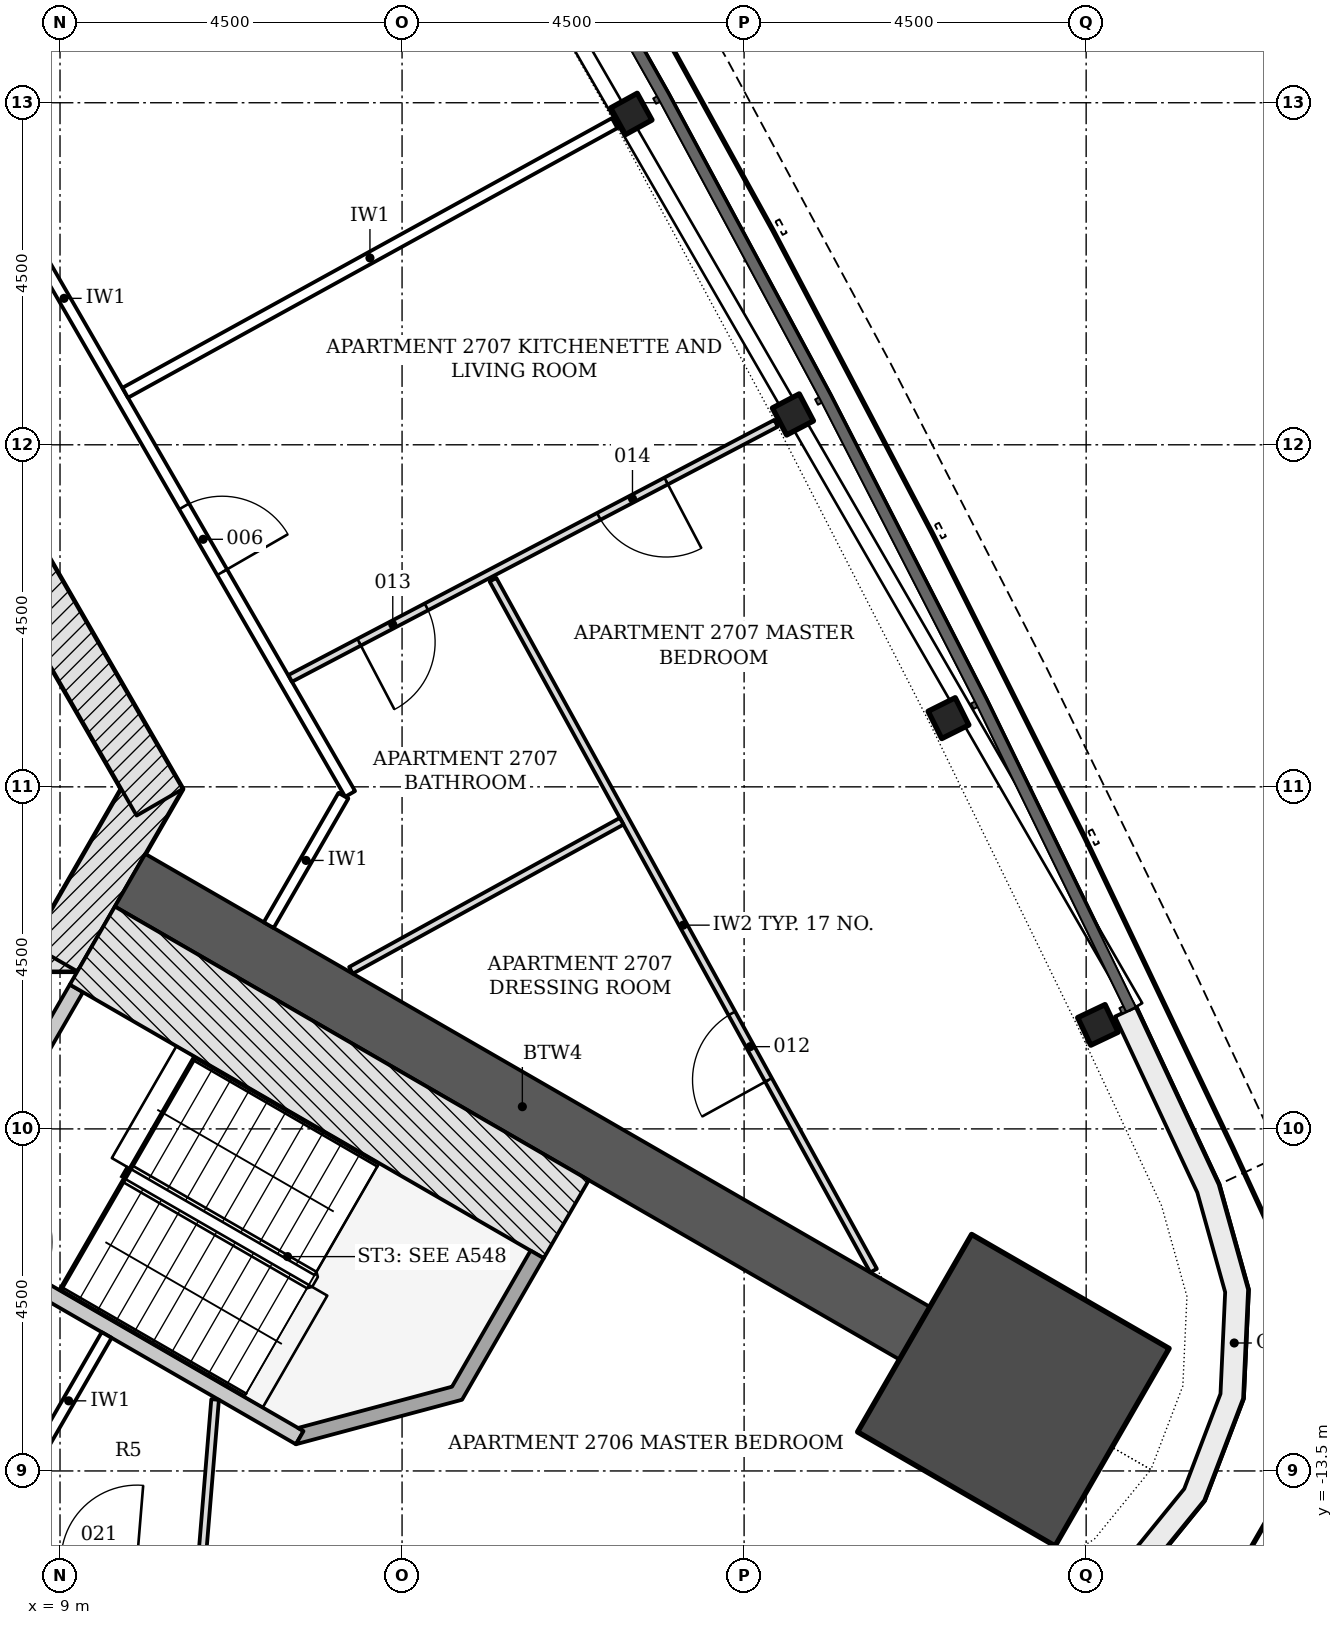
"""IFC4 building model, lengths in metres.
Left out: names, types, materials, properties, quantities, classifications, styles, units other than length and angle.
Written with IfcOpenShell. Run it as: python <this file> out.ifc"""

import sys

from ifc_helpers import new_model, si_unit, direction, frame, frame_2d, origin, origin_2d, place, context, subcontext, project, spatial, polyline, rectangle, i_section, outline, extrude, element, fill, save


model = new_model("IFC4")
c1 = context("Model", 3, precision=1e-05, world=origin(), true_north=direction((0.0, 1.0)))
c2 = subcontext(c1, "Body", "Model", "MODEL_VIEW")
j1 = project(units=[si_unit("LENGTHUNIT", "METRE"), si_unit("PLANEANGLEUNIT", "RADIAN")], contexts=[c1])
p1 = place(None, origin())
s1 = spatial("IfcSite", under=j1, at=p1, CompositionType="ELEMENT")
p2 = place(p1, origin())
s2 = spatial("IfcBuilding", under=s1, at=p2, CompositionType="ELEMENT")
p3 = place(p2, frame((0.0, 0.0, 105.9)))
s3 = spatial("IfcBuildingStorey", under=s2, at=p3, CompositionType="ELEMENT", Elevation=105.9)
p4 = place(p3, frame((-9.229, -6.578, -0.2), z_axis=(0.0, 0.0, 1.0), x_axis=(1.0, 0.0, 0.0)))
e1 = element("IfcWall", 1, at=p4, inside=s3, PredefinedType="SHEAR", context=c2, shape_type="SweptSolid", body=[
    extrude(rectangle(XDim=18.458, YDim=0.7, at=frame_2d((9.229, 0.0))), origin(), (0.0, 0.0, 1.0), 3.6),
])
p5 = place(p4, frame((3.304, 0.0, 0.2)))
e2 = element("IfcOpeningElement", 2, at=p5, cuts=e1, PredefinedType="OPENING", context=c2, shape_type="SweptSolid", body=[
    extrude(rectangle(XDim=1.1, YDim=2.1, at=frame_2d((0.55, 1.05))), frame((0.0, 0.36, 0.0), z_axis=(0.0, -1.0, 0.0), x_axis=(1.0, 0.0, 0.0)), (0.0, 0.0, 1.0), 0.72),
])
p6 = place(p4, frame((5.454, 0.0, 0.2)))
e3 = element("IfcOpeningElement", 3, at=p6, cuts=e1, PredefinedType="OPENING", context=c2, shape_type="SweptSolid", body=[
    extrude(rectangle(XDim=1.1, YDim=2.1, at=frame_2d((0.55, 1.05))), frame((0.0, 0.36, 0.0), z_axis=(0.0, -1.0, 0.0), x_axis=(1.0, 0.0, 0.0)), (0.0, 0.0, 1.0), 0.72),
])
p7 = place(p4, frame((7.604, 0.0, 0.2)))
e4 = element("IfcOpeningElement", 4, at=p7, cuts=e1, PredefinedType="OPENING", context=c2, shape_type="SweptSolid", body=[
    extrude(rectangle(XDim=1.1, YDim=2.1, at=frame_2d((0.55, 1.05))), frame((0.0, 0.36, 0.0), z_axis=(0.0, -1.0, 0.0), x_axis=(1.0, 0.0, 0.0)), (0.0, 0.0, 1.0), 0.72),
])
p8 = place(p4, frame((9.754, 0.0, 0.2)))
e5 = element("IfcOpeningElement", 5, at=p8, cuts=e1, PredefinedType="OPENING", context=c2, shape_type="SweptSolid", body=[
    extrude(rectangle(XDim=1.1, YDim=2.1, at=frame_2d((0.55, 1.05))), frame((0.0, 0.36, 0.0), z_axis=(0.0, -1.0, 0.0), x_axis=(1.0, 0.0, 0.0)), (0.0, 0.0, 1.0), 0.72),
])
p9 = place(p4, frame((11.904, 0.0, 0.2)))
e6 = element("IfcOpeningElement", 6, at=p9, cuts=e1, PredefinedType="OPENING", context=c2, shape_type="SweptSolid", body=[
    extrude(rectangle(XDim=1.1, YDim=2.1, at=frame_2d((0.55, 1.05))), frame((0.0, 0.36, 0.0), z_axis=(0.0, -1.0, 0.0), x_axis=(1.0, 0.0, 0.0)), (0.0, 0.0, 1.0), 0.72),
])
p10 = place(p4, frame((14.054, 0.0, 0.2)))
e7 = element("IfcOpeningElement", 7, at=p10, cuts=e1, PredefinedType="OPENING", context=c2, shape_type="SweptSolid", body=[
    extrude(rectangle(XDim=1.1, YDim=2.1, at=frame_2d((0.55, 1.05))), frame((0.0, 0.36, 0.0), z_axis=(0.0, -1.0, 0.0), x_axis=(1.0, 0.0, 0.0)), (0.0, 0.0, 1.0), 0.72),
])
p11 = place(p4, frame((1.029, 0.0, 0.2)))
e8 = element("IfcOpeningElement", 8, at=p11, cuts=e1, PredefinedType="OPENING", context=c2, shape_type="SweptSolid", body=[
    extrude(rectangle(XDim=1.0, YDim=2.1, at=frame_2d((0.5, 1.05))), frame((0.0, 0.36, 0.0), z_axis=(0.0, -1.0, 0.0), x_axis=(1.0, 0.0, 0.0)), (0.0, 0.0, 1.0), 0.72),
])
p12 = place(p3, frame((8.926, -6.753, -0.2), z_axis=(0.0, 0.0, 1.0), x_axis=(0.500042739161, 0.866000726912, 0.0)))
e9 = element("IfcWall", 9, at=p12, inside=s3, PredefinedType="SHEAR", context=c2, shape_type="SweptSolid", body=[
    extrude(rectangle(XDim=2.771, YDim=0.7, at=frame_2d((1.386, 0.0))), origin(), (0.0, 0.0, 1.0), 3.6),
])
p13 = place(p3, frame((10.311, -4.703, -0.2), z_axis=(0.0, 0.0, 1.0), x_axis=(-0.500001446645, 0.866024568562, 0.0)))
e10 = element("IfcWall", 10, at=p13, inside=s3, PredefinedType="SHEAR", context=c2, shape_type="SweptSolid", body=[
    extrude(rectangle(XDim=18.458, YDim=0.7, at=frame_2d((9.229, 0.0))), origin(), (0.0, 0.0, 1.0), 3.6),
])
p14 = place(p13, frame((10.5, 0.0, 0.2)))
e11 = element("IfcOpeningElement", 11, at=p14, cuts=e10, PredefinedType="OPENING", context=c2, shape_type="SweptSolid", body=[
    extrude(rectangle(XDim=1.0, YDim=2.1, at=frame_2d((0.5, 1.05))), frame((0.0, 0.36, 0.0), z_axis=(0.0, -1.0, 0.0), x_axis=(1.0, 0.0, 0.0)), (0.0, 0.0, 1.0), 0.72),
])
p15 = place(p13, frame((4.877, 0.0, 0.2)))
e12 = element("IfcOpeningElement", 12, at=p15, cuts=e10, PredefinedType="OPENING", context=c2, shape_type="SweptSolid", body=[
    extrude(rectangle(XDim=0.9, YDim=2.1, at=frame_2d((0.45, 1.05))), frame((0.0, 0.36, 0.0), z_axis=(0.0, -1.0, 0.0), x_axis=(1.0, 0.0, 0.0)), (0.0, 0.0, 1.0), 0.72),
])
p16 = place(p13, frame((14.452, 0.0, 0.2)))
e13 = element("IfcOpeningElement", 13, at=p16, cuts=e10, PredefinedType="OPENING", context=c2, shape_type="SweptSolid", body=[
    extrude(rectangle(XDim=0.9, YDim=2.1, at=frame_2d((0.45, 1.05))), frame((0.0, 0.36, 0.0), z_axis=(0.0, -1.0, 0.0), x_axis=(1.0, 0.0, 0.0)), (0.0, 0.0, 1.0), 0.72),
])
p17 = place(p3, frame((9.922, -5.728, -0.2), z_axis=(0.0, 0.0, 1.0), x_axis=(0.866027307971, -0.499996701837, 0.0)))
e14 = element("IfcWall", 14, at=p17, inside=s3, PredefinedType="SHEAR", context=c2, shape_type="SweptSolid", body=[
    extrude(rectangle(XDim=11.918, YDim=0.8, at=frame_2d((5.959, 0.0))), origin(), (0.0, 0.0, 1.0), 3.6),
])
p18 = place(p3, frame((21.542, -12.438, -0.2), z_axis=(0.0, 0.0, 1.0), x_axis=(0.866025403784, -0.5, 0.0)))
e15 = element("IfcColumn", 15, at=p18, inside=s3, PredefinedType="COLUMN", context=c2, shape_type="SweptSolid", body=[
    extrude(rectangle(XDim=3.0, YDim=3.0, at=origin_2d()), origin(), (0.0, 0.0, 1.0), 3.6),
])
for number, where, z_axis, x_axis in (
    (16, (22.655, -7.632, -0.2), (0.0, 0.0, 1.0), (-0.429, 0.903, 0.0)),
    (17, (20.689, -3.596, -0.2), (0.0, 0.0, 1.0), (-0.447, 0.895, 0.0)),
    (18, (18.642, 0.399, -0.2), (0.0, 0.0, 1.0), (-0.465, 0.885, 0.0)),
    (19, (16.516, 4.353, -0.2), (0.0, 0.0, 1.0), (-0.483, 0.876, 0.0)),
):
    element("IfcColumn", number, at=place(p3, frame(where, z_axis=z_axis, x_axis=x_axis)), inside=s3, PredefinedType="COLUMN", context=c2, shape_type="SweptSolid", body=[
        extrude(i_section(OverallWidth=0.401, OverallDepth=0.399, WebThickness=0.025, FlangeThickness=0.04, FilletRadius=0.015, at=origin_2d()), origin(), (0.0, 0.0, 1.0), 3.6),
    ])
p19 = place(p3, origin())
e20 = element("IfcWall", 20, at=p19, inside=s3, PredefinedType="NOTDEFINED", context=c2, shape_type="SweptSolid", body=[
    extrude(outline(polyline([(17.981, -16.352), (20.551, -16.13), (21.94, -15.774), (23.148, -15.0), (24.054, -13.887), (24.565, -12.547), (24.631, -11.114), (24.245, -9.732), (23.152, -7.396), (22.88, -7.523), (23.962, -9.837), (24.329, -11.148), (24.267, -12.485), (23.791, -13.735), (22.946, -14.774), (21.819, -15.495), (20.5, -15.833), (17.955, -16.053), (17.981, -16.352)])), origin(), (0.0, 0.0, 1.0), 3.3),
])
p20 = place(p3, frame((7.44, -10.226, -0.2), z_axis=(0.0, 0.0, 1.0), x_axis=(0.500022077904, 0.866012656725, 0.0)))
e21 = element("IfcWall", 21, at=p20, inside=s3, PredefinedType="SHEAR", context=c2, shape_type="SweptSolid", body=[
    extrude(rectangle(XDim=3.55, YDim=0.2, at=frame_2d((1.775, 0.0))), origin(), (0.0, 0.0, 1.0), 3.6),
])
p21 = place(p20, frame((1.175, 0.0, 0.2)))
e22 = element("IfcOpeningElement", 22, at=p21, cuts=e21, PredefinedType="OPENING", context=c2, shape_type="SweptSolid", body=[
    extrude(rectangle(XDim=1.2, YDim=2.1, at=frame_2d((0.6, 1.05))), frame((0.0, 0.11, 0.0), z_axis=(0.0, -1.0, 0.0), x_axis=(1.0, 0.0, 0.0)), (0.0, 0.0, 1.0), 0.22),
])
p22 = place(p3, frame((7.304, -10.262, -0.2), z_axis=(0.0, 0.0, 1.0), x_axis=(0.866026594901, -0.49999793692, 0.0)))
e23 = element("IfcWall", 23, at=p22, inside=s3, PredefinedType="SHEAR", context=c2, shape_type="SweptSolid", body=[
    extrude(rectangle(XDim=5.6, YDim=0.2, at=frame_2d((2.8, 0.0))), origin(), (0.0, 0.0, 1.0), 3.6),
])
p23 = place(p22, frame((0.45, 0.0, 0.2)))
e24 = element("IfcOpeningElement", 24, at=p23, cuts=e23, PredefinedType="OPENING", context=c2, shape_type="SweptSolid", body=[
    extrude(rectangle(XDim=1.2, YDim=2.1, at=frame_2d((0.6, 1.05))), frame((0.0, 0.11, 0.0), z_axis=(0.0, -1.0, 0.0), x_axis=(1.0, 0.0, 0.0)), (0.0, 0.0, 1.0), 0.22),
])
p24 = place(p3, frame((9.425, -6.588, -0.2), z_axis=(0.0, 0.0, 1.0), x_axis=(0.866018442252, -0.500012057535, 0.0)))
e25 = element("IfcWall", 25, at=p24, inside=s3, PredefinedType="SHEAR", context=c2, shape_type="SweptSolid", body=[
    extrude(rectangle(XDim=7.2, YDim=1.186, at=frame_2d((3.6, 0.0))), origin(), (0.0, 0.0, 1.0), 3.6),
])
p25 = place(p3, frame((0.0, 0.0, -0.2)))
e26 = element("IfcWall", 26, at=p25, inside=s3, PredefinedType="SHEAR", context=c2, shape_type="SweptSolid", body=[
    extrude(outline(polyline([(12.104, -13.149), (14.289, -12.563), (15.364, -10.701), (15.191, -10.601), (14.157, -12.392), (12.132, -12.934), (12.204, -12.976), (12.204, -12.976), (12.204, -12.976), (12.204, -12.976), (12.204, -12.976), (12.204, -12.976), (12.204, -12.976), (12.204, -12.976), (12.204, -12.976), (12.204, -12.976), (12.204, -12.976), (12.204, -12.976), (12.204, -12.976), (12.204, -12.976), (12.204, -12.976), (12.204, -12.976), (12.204, -12.976), (12.104, -13.149)])), origin(), (0.0, 0.0, 1.0), 3.6),
])
p26 = place(p3, frame((5.289, 8.446, 0.0), z_axis=(0.0, 0.0, 1.0), x_axis=(0.499996620721, -0.866027354803, 0.0)))
e27 = element("IfcWall", 27, at=p26, inside=s3, PredefinedType="PARTITIONING", context=c2, shape_type="SweptSolid", body=[
    extrude(rectangle(XDim=15.057, YDim=0.15, at=frame_2d((7.528, 0.0))), origin(), (0.0, 0.0, 1.0), 2.847),
])
p27 = place(p26, frame((10.689, 0.0, 0.0)))
e28 = element("IfcOpeningElement", 28, at=p27, cuts=e27, PredefinedType="OPENING", context=c2, shape_type="SweptSolid", body=[
    extrude(rectangle(XDim=1.0, YDim=2.1, at=frame_2d((0.5, 1.05))), frame((0.0, 0.085, 0.0), z_axis=(0.0, -1.0, 0.0), x_axis=(1.0, 0.0, 0.0)), (0.0, 0.0, 1.0), 0.17),
])
p28 = place(p26, frame((4.695, 0.0, 0.0)))
e29 = element("IfcOpeningElement", 29, at=p28, cuts=e27, PredefinedType="OPENING", context=c2, shape_type="SweptSolid", body=[
    extrude(rectangle(XDim=1.0, YDim=2.1, at=frame_2d((0.5, 1.05))), frame((0.0, 0.085, 0.0), z_axis=(0.0, -1.0, 0.0), x_axis=(1.0, 0.0, 0.0)), (0.0, 0.0, 1.0), 0.17),
])
p29 = place(p3, frame((8.614, -13.444, 0.0), z_axis=(0.0, 0.0, 1.0), x_axis=(0.499972520799, 0.866041268327, 0.0)))
e30 = element("IfcWall", 30, at=p29, inside=s3, PredefinedType="PARTITIONING", context=c2, shape_type="SweptSolid", body=[
    extrude(rectangle(XDim=2.0, YDim=0.15, at=frame_2d((1.0, 0.0))), origin(), (0.0, 0.0, 1.0), 2.923),
])
p30 = place(p3, frame((11.745, -6.319, 0.0), z_axis=(0.0, 0.0, 1.0), x_axis=(0.500012721296, 0.866018059016, 0.0)))
e31 = element("IfcWall", 31, at=p30, inside=s3, PredefinedType="PARTITIONING", context=c2, shape_type="SweptSolid", body=[
    extrude(rectangle(XDim=1.966, YDim=0.15, at=frame_2d((0.983, 0.0))), origin(), (0.0, 0.0, 1.0), 3.4),
])
p31 = place(p3, frame((16.297, 4.232, 0.0), z_axis=(0.0, 0.0, 1.0), x_axis=(-0.875895262359, -0.482501284327, 0.0)))
e32 = element("IfcWall", 32, at=p31, inside=s3, PredefinedType="PARTITIONING", context=c2, shape_type="SweptSolid", body=[
    extrude(rectangle(XDim=7.351, YDim=0.15, at=frame_2d((3.676, 0.0))), origin(), (0.0, 0.0, 1.0), 2.847),
])
p32 = place(p3, frame((19.703, -10.864, 0.0), z_axis=(0.0, 0.0, 1.0), x_axis=(-0.482505676042, 0.875892843096, 0.0)))
e33 = element("IfcWall", 33, at=p32, inside=s3, PredefinedType="PARTITIONING", context=c2, shape_type="SweptSolid", body=[
    extrude(rectangle(XDim=10.377, YDim=0.1, at=frame_2d((5.188, 0.0))), origin(), (0.0, 0.0, 1.0), 2.847),
])
p33 = place(p32, frame((2.864, 0.0, 0.0)))
e34 = element("IfcOpeningElement", 34, at=p33, cuts=e33, PredefinedType="OPENING", context=c2, shape_type="SweptSolid", body=[
    extrude(rectangle(XDim=1.0, YDim=2.1, at=frame_2d((0.5, 1.05))), frame((0.0, 0.06, 0.0), z_axis=(0.0, -1.0, 0.0), x_axis=(1.0, 0.0, 0.0)), (0.0, 0.0, 1.0), 0.12),
])
p34 = place(p3, frame((18.421, 0.283, 0.0), z_axis=(0.0, 0.0, 1.0), x_axis=(-0.885392336097, -0.464844502151, 0.0)))
e35 = element("IfcWall", 35, at=p34, inside=s3, PredefinedType="PARTITIONING", context=c2, shape_type="SweptSolid", body=[
    extrude(rectangle(XDim=7.22, YDim=0.1, at=frame_2d((3.61, 0.0))), origin(), (0.0, 0.0, 1.0), 2.847),
])
p35 = place(p34, frame((5.196, 0.0, 0.0)))
e36 = element("IfcOpeningElement", 36, at=p35, cuts=e35, PredefinedType="OPENING", context=c2, shape_type="SweptSolid", body=[
    extrude(rectangle(XDim=1.0, YDim=2.1, at=frame_2d((0.5, 1.05))), frame((0.0, 0.06, 0.0), z_axis=(0.0, -1.0, 0.0), x_axis=(1.0, 0.0, 0.0)), (0.0, 0.0, 1.0), 0.12),
])
p36 = place(p34, frame((1.634, 0.0, 0.0)))
e37 = element("IfcOpeningElement", 37, at=p36, cuts=e35, PredefinedType="OPENING", context=c2, shape_type="SweptSolid", body=[
    extrude(rectangle(XDim=1.0, YDim=2.1, at=frame_2d((0.5, 1.05))), frame((0.0, 0.06, 0.0), z_axis=(0.0, -1.0, 0.0), x_axis=(1.0, 0.0, 0.0)), (0.0, 0.0, 1.0), 0.12),
])
p37 = place(p3, frame((16.389, -4.952, 0.0), z_axis=(0.0, 0.0, 1.0), x_axis=(-0.875896259157, -0.482499474814, 0.0)))
e38 = element("IfcWall", 38, at=p37, inside=s3, PredefinedType="PARTITIONING", context=c2, shape_type="SweptSolid", body=[
    extrude(rectangle(XDim=4.066, YDim=0.1, at=frame_2d((2.033, 0.0))), origin(), (0.0, 0.0, 1.0), 3.4),
])
p38 = place(p3, frame((11.04, -12.56, 0.0), z_axis=(0.0, 0.0, 1.0), x_axis=(-0.08207509454, -0.996626147989, 0.0)))
e39 = element("IfcWall", 39, at=p38, inside=s3, PredefinedType="PARTITIONING", context=c2, shape_type="SweptSolid", body=[
    extrude(rectangle(XDim=4.102, YDim=0.1, at=frame_2d((2.051, 0.0))), origin(), (0.0, 0.0, 1.0), 2.974),
])
p39 = place(p38, frame((2.324, 0.0, 0.0)))
e40 = element("IfcOpeningElement", 40, at=p39, cuts=e39, PredefinedType="OPENING", context=c2, shape_type="SweptSolid", body=[
    extrude(rectangle(XDim=1.0, YDim=2.1, at=frame_2d((0.5, 1.05))), frame((0.0, 0.06, 0.0), z_axis=(0.0, -1.0, 0.0), x_axis=(1.0, 0.0, 0.0)), (0.0, 0.0, 1.0), 0.12),
])
p40 = place(p27, origin())
e41 = element("IfcDoor", 41, at=p40, inside=s3, OperationType="SINGLE_SWING_RIGHT", PredefinedType="DOOR", context=c2, shape_type="SweptSolid", body=[
    extrude(rectangle(XDim=1.0, YDim=2.1, at=frame_2d((0.5, 1.05))), frame((0.0, 0.025, 0.0), z_axis=(0.0, -1.0, 0.0), x_axis=(1.0, 0.0, 0.0)), (0.0, 0.0, 1.0), 0.05),
])
fill(e28, e41)
p41 = place(p33, origin())
e42 = element("IfcDoor", 42, at=p41, inside=s3, OperationType="SINGLE_SWING_LEFT", PredefinedType="DOOR", context=c2, shape_type="SweptSolid", body=[
    extrude(rectangle(XDim=1.0, YDim=2.1, at=frame_2d((0.5, 1.05))), frame((0.0, 0.025, 0.0), z_axis=(0.0, -1.0, 0.0), x_axis=(1.0, 0.0, 0.0)), (0.0, 0.0, 1.0), 0.05),
])
fill(e34, e42)
p42 = place(p35, origin())
e43 = element("IfcDoor", 43, at=p42, inside=s3, OperationType="SINGLE_SWING_RIGHT", PredefinedType="DOOR", context=c2, shape_type="SweptSolid", body=[
    extrude(rectangle(XDim=1.0, YDim=2.1, at=frame_2d((0.5, 1.05))), frame((0.0, 0.025, 0.0), z_axis=(0.0, -1.0, 0.0), x_axis=(1.0, 0.0, 0.0)), (0.0, 0.0, 1.0), 0.05),
])
fill(e36, e43)
p43 = place(p36, origin())
e44 = element("IfcDoor", 44, at=p43, inside=s3, OperationType="SINGLE_SWING_LEFT", PredefinedType="DOOR", context=c2, shape_type="SweptSolid", body=[
    extrude(rectangle(XDim=1.0, YDim=2.1, at=frame_2d((0.5, 1.05))), frame((0.0, 0.025, 0.0), z_axis=(0.0, -1.0, 0.0), x_axis=(1.0, 0.0, 0.0)), (0.0, 0.0, 1.0), 0.05),
])
fill(e37, e44)
save(model, sys.argv[1])
